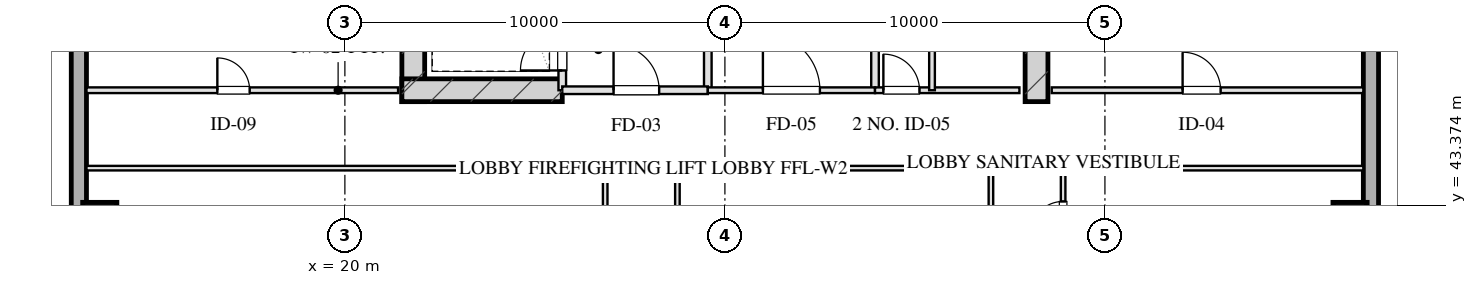
"""IFC4 building model, lengths in metres.
Left out: names, types, materials, properties, quantities, classifications, styles, units other than length and angle.
Written with IfcOpenShell. Run it as: python <this file> out.ifc"""

import sys

from ifc_helpers import new_model, si_unit, direction, frame, frame_2d, origin, origin_2d, place, context, subcontext, project, spatial, rectangle, hollow_rectangle, extrude, element, fill, save


model = new_model("IFC4")
c1 = context("Model", 3, precision=1e-05, world=origin(), true_north=direction((0.0, 1.0)))
c2 = subcontext(c1, "Body", "Model", "MODEL_VIEW")
j1 = project(units=[si_unit("LENGTHUNIT", "METRE"), si_unit("PLANEANGLEUNIT", "RADIAN")], contexts=[c1])
p1 = place(None, origin())
s1 = spatial("IfcSite", under=j1, at=p1, CompositionType="ELEMENT")
p2 = place(p1, origin())
s2 = spatial("IfcBuilding", under=s1, at=p2, CompositionType="ELEMENT")
p3 = place(p2, frame((0.0, 0.0, 159.85)))
s3 = spatial("IfcBuildingStorey", under=s2, at=p3, CompositionType="ELEMENT", Elevation=159.85)
for number, where, z_axis, x_axis in (
    (1, (21.8, 46.1, 0.0), (0.0, 0.0, 1.0), (0.0, 1.0, 0.0)),
    (2, (38.2, 46.1, 0.0), (0.0, 0.0, 1.0), (0.0, 1.0, 0.0)),
):
    element("IfcWall", number, at=place(p3, frame(where, z_axis=z_axis, x_axis=x_axis)), inside=s3, PredefinedType="SHEAR", context=c2, shape_type="SweptSolid", body=[
        extrude(rectangle(XDim=9.48, YDim=0.6, at=frame_2d((4.74, 0.0))), origin(), (0.0, 0.0, 1.0), 3.45),
    ])
p4 = place(p3, frame((21.5, 46.4, 0.0), z_axis=(0.0, 0.0, 1.0), x_axis=(1.0, 0.0, 0.0)))
e3 = element("IfcWall", 3, at=p4, inside=s3, PredefinedType="SHEAR", context=c2, shape_type="SweptSolid", body=[
    extrude(rectangle(XDim=4.22, YDim=0.6, at=frame_2d((2.11, 0.0))), origin(), (0.0, 0.0, 1.0), 3.45),
])
for number, where, z_axis, x_axis in (
    (4, (13.55, 43.0, 0.0), (0.0, 0.0, 1.0), (1.0, 0.0, 0.0)),
    (5, (46.45, 43.0, 0.0), (0.0, 0.0, 1.0), (1.0, 0.0, 0.0)),
):
    element("IfcColumn", number, at=place(p3, frame(where, z_axis=z_axis, x_axis=x_axis)), inside=s3, PredefinedType="COLUMN", context=c2, shape_type="SweptSolid", body=[
        extrude(hollow_rectangle(XDim=0.9, YDim=0.9, WallThickness=0.032, at=origin_2d()), origin(), (0.0, 0.0, 1.0), 3.451),
    ])
p5 = place(p3, frame((13.0, 10.8, 0.0), z_axis=(0.0, 0.0, 1.0), x_axis=(0.0, 1.0, 0.0)))
e6 = element("IfcWall", 6, at=p5, inside=s3, PredefinedType="SOLIDWALL", context=c2, shape_type="SweptSolid", body=[
    extrude(rectangle(XDim=46.4, YDim=0.4, at=frame_2d((23.2, 0.0))), origin(), (0.0, 0.0, 1.0), 2.61),
])
p6 = place(p5, frame((15.675, 0.0, 0.75)))
e7 = element("IfcOpeningElement", 7, at=p6, cuts=e6, PredefinedType="OPENING", context=c2, shape_type="SweptSolid", body=[
    extrude(rectangle(XDim=2.25, YDim=1.46, at=frame_2d((1.125, 0.73))), frame((0.0, 0.21, 0.0), z_axis=(0.0, -1.0, 0.0), x_axis=(1.0, 0.0, 0.0)), (0.0, 0.0, 1.0), 0.42),
])
p7 = place(p5, frame((28.475, 0.0, 0.75)))
e8 = element("IfcOpeningElement", 8, at=p7, cuts=e6, PredefinedType="OPENING", context=c2, shape_type="SweptSolid", body=[
    extrude(rectangle(XDim=2.25, YDim=1.46, at=frame_2d((1.125, 0.73))), frame((0.0, 0.21, 0.0), z_axis=(0.0, -1.0, 0.0), x_axis=(1.0, 0.0, 0.0)), (0.0, 0.0, 1.0), 0.42),
])
p8 = place(p3, frame((47.0, 57.2, 0.0), z_axis=(0.0, 0.0, 1.0), x_axis=(0.0, -1.0, 0.0)))
e9 = element("IfcWall", 9, at=p8, inside=s3, PredefinedType="SOLIDWALL", context=c2, shape_type="SweptSolid", body=[
    extrude(rectangle(XDim=46.4, YDim=0.4, at=frame_2d((23.2, 0.0))), origin(), (0.0, 0.0, 1.0), 2.61),
])
p9 = place(p3, frame((25.72, 46.4, 0.0), z_axis=(0.0, 0.0, 1.0), x_axis=(0.0, 1.0, 0.0)))
e10 = element("IfcWall", 10, at=p9, inside=s3, PredefinedType="PARTITIONING", context=c2, shape_type="SweptSolid", body=[
    extrude(rectangle(XDim=1.9, YDim=0.2, at=frame_2d((0.95, 0.0))), origin(), (0.0, 0.0, 1.0), 3.175),
])
p10 = place(p9, frame((0.52, 0.0, 0.0)))
e11 = element("IfcOpeningElement", 11, at=p10, cuts=e10, PredefinedType="OPENING", context=c2, shape_type="SweptSolid", body=[
    extrude(rectangle(XDim=1.1, YDim=2.05, at=frame_2d((0.55, 1.025))), frame((0.0, 0.11, 0.0), z_axis=(0.0, -1.0, 0.0), x_axis=(1.0, 0.0, 0.0)), (0.0, 0.0, 1.0), 0.22),
])
p11 = place(p3, frame((29.55, 46.4, 0.0), z_axis=(0.0, 0.0, 1.0), x_axis=(0.0, 1.0, 0.0)))
e12 = element("IfcWall", 12, at=p11, inside=s3, PredefinedType="PARTITIONING", context=c2, shape_type="SweptSolid", body=[
    extrude(rectangle(XDim=8.43, YDim=0.2, at=frame_2d((4.215, 0.0))), origin(), (0.0, 0.0, 1.0), 3.175),
])
p12 = place(p3, frame((25.72, 46.4, 0.0), z_axis=(0.0, 0.0, 1.0), x_axis=(1.0, 0.0, 0.0)))
e13 = element("IfcWall", 13, at=p12, inside=s3, PredefinedType="PARTITIONING", context=c2, shape_type="SweptSolid", body=[
    extrude(rectangle(XDim=3.83, YDim=0.2, at=frame_2d((1.915, 0.0))), origin(), (0.0, 0.0, 1.0), 3.175),
])
p13 = place(p12, frame((1.35, 0.0, 0.0)))
e14 = element("IfcOpeningElement", 14, at=p13, cuts=e13, PredefinedType="OPENING", context=c2, shape_type="SweptSolid", body=[
    extrude(rectangle(XDim=1.2, YDim=2.05, at=frame_2d((0.6, 1.025))), frame((0.0, 0.11, 0.0), z_axis=(0.0, -1.0, 0.0), x_axis=(1.0, 0.0, 0.0)), (0.0, 0.0, 1.0), 0.22),
])
p14 = place(p3, frame((33.95, 46.4, 0.0), z_axis=(0.0, 0.0, 1.0), x_axis=(0.0, 1.0, 0.0)))
e15 = element("IfcWall", 15, at=p14, inside=s3, PredefinedType="PARTITIONING", context=c2, shape_type="SweptSolid", body=[
    extrude(rectangle(XDim=8.43, YDim=0.2, at=frame_2d((4.215, 0.0))), origin(), (0.0, 0.0, 1.0), 3.175),
])
p15 = place(p3, frame((29.55, 46.4, 0.0), z_axis=(0.0, 0.0, 1.0), x_axis=(1.0, 0.0, 0.0)))
e16 = element("IfcWall", 16, at=p15, inside=s3, PredefinedType="PARTITIONING", context=c2, shape_type="SweptSolid", body=[
    extrude(rectangle(XDim=4.4, YDim=0.15, at=frame_2d((2.2, 0.0))), origin(), (0.0, 0.0, 1.0), 3.175),
])
p16 = place(p15, frame((1.45, 0.0, 0.0)))
e17 = element("IfcOpeningElement", 17, at=p16, cuts=e16, PredefinedType="OPENING", context=c2, shape_type="SweptSolid", body=[
    extrude(rectangle(XDim=1.5, YDim=2.05, at=frame_2d((0.75, 1.025))), frame((0.0, 0.085, 0.0), z_axis=(0.0, -1.0, 0.0), x_axis=(1.0, 0.0, 0.0)), (0.0, 0.0, 1.0), 0.17),
])
p17 = place(p3, frame((33.95, 46.4, 0.0), z_axis=(0.0, 0.0, 1.0), x_axis=(1.0, 0.0, 0.0)))
e18 = element("IfcWall", 18, at=p17, inside=s3, PredefinedType="PARTITIONING", context=c2, shape_type="SweptSolid", body=[
    extrude(rectangle(XDim=3.8, YDim=0.15, at=frame_2d((1.9, 0.0))), origin(), (0.0, 0.0, 1.0), 3.175),
])
p18 = place(p17, frame((0.22, 0.0, 0.0)))
e19 = element("IfcOpeningElement", 19, at=p18, cuts=e18, PredefinedType="OPENING", context=c2, shape_type="SweptSolid", body=[
    extrude(rectangle(XDim=0.95, YDim=2.05, at=frame_2d((0.475, 1.025))), frame((0.0, 0.085, 0.0), z_axis=(0.0, -1.0, 0.0), x_axis=(1.0, 0.0, 0.0)), (0.0, 0.0, 1.0), 0.17),
])
p19 = place(p3, frame((35.45, 46.4, 0.0), z_axis=(0.0, 0.0, 1.0), x_axis=(0.0, 1.0, 0.0)))
e20 = element("IfcWall", 20, at=p19, inside=s3, PredefinedType="PARTITIONING", context=c2, shape_type="SweptSolid", body=[
    extrude(rectangle(XDim=8.43, YDim=0.15, at=frame_2d((4.215, 0.0))), origin(), (0.0, 0.0, 1.0), 2.765),
])
p20 = place(p19, frame((2.55, 0.0, 0.0)))
e21 = element("IfcOpeningElement", 21, at=p20, cuts=e20, PredefinedType="OPENING", context=c2, shape_type="SweptSolid", body=[
    extrude(rectangle(XDim=0.95, YDim=2.05, at=frame_2d((0.475, 1.025))), frame((0.0, 0.085, 0.0), z_axis=(0.0, -1.0, 0.0), x_axis=(1.0, 0.0, 0.0)), (0.0, 0.0, 1.0), 0.17),
])
p21 = place(p19, frame((4.7, 0.0, 0.0)))
e22 = element("IfcOpeningElement", 22, at=p21, cuts=e20, PredefinedType="OPENING", context=c2, shape_type="SweptSolid", body=[
    extrude(rectangle(XDim=0.9, YDim=2.05, at=frame_2d((0.45, 1.025))), frame((0.0, 0.085, 0.0), z_axis=(0.0, -1.0, 0.0), x_axis=(1.0, 0.0, 0.0)), (0.0, 0.0, 1.0), 0.17),
])
p22 = place(p19, frame((6.8, 0.0, 0.0)))
e23 = element("IfcOpeningElement", 23, at=p22, cuts=e20, PredefinedType="OPENING", context=c2, shape_type="SweptSolid", body=[
    extrude(rectangle(XDim=0.9, YDim=2.05, at=frame_2d((0.45, 1.025))), frame((0.0, 0.085, 0.0), z_axis=(0.0, -1.0, 0.0), x_axis=(1.0, 0.0, 0.0)), (0.0, 0.0, 1.0), 0.17),
])
p23 = place(p3, frame((13.2, 46.4, 0.0), z_axis=(0.0, 0.0, 1.0), x_axis=(1.0, 0.0, 0.0)))
e24 = element("IfcWall", 24, at=p23, inside=s3, PredefinedType="PARTITIONING", context=c2, shape_type="SweptSolid", body=[
    extrude(rectangle(XDim=8.2, YDim=0.15, at=frame_2d((4.1, 0.0))), origin(), (0.0, 0.0, 1.0), 3.175),
])
p24 = place(p23, frame((3.444, 0.0, 0.0)))
e25 = element("IfcOpeningElement", 25, at=p24, cuts=e24, PredefinedType="OPENING", context=c2, shape_type="SweptSolid", body=[
    extrude(rectangle(XDim=0.85, YDim=2.05, at=frame_2d((0.425, 1.025))), frame((0.0, 0.085, 0.0), z_axis=(0.0, -1.0, 0.0), x_axis=(1.0, 0.0, 0.0)), (0.0, 0.0, 1.0), 0.17),
])
p25 = place(p3, frame((38.6, 46.4, 0.0), z_axis=(0.0, 0.0, 1.0), x_axis=(1.0, 0.0, 0.0)))
e26 = element("IfcWall", 26, at=p25, inside=s3, PredefinedType="PARTITIONING", context=c2, shape_type="SweptSolid", body=[
    extrude(rectangle(XDim=8.2, YDim=0.15, at=frame_2d((4.1, 0.0))), origin(), (0.0, 0.0, 1.0), 3.175),
])
p26 = place(p25, frame((3.444, 0.0, 0.0)))
e27 = element("IfcOpeningElement", 27, at=p26, cuts=e26, PredefinedType="OPENING", context=c2, shape_type="SweptSolid", body=[
    extrude(rectangle(XDim=1.0, YDim=2.05, at=frame_2d((0.5, 1.025))), frame((0.0, 0.085, 0.0), z_axis=(0.0, -1.0, 0.0), x_axis=(1.0, 0.0, 0.0)), (0.0, 0.0, 1.0), 0.17),
])
p27 = place(p3, frame((13.2, 44.35, 0.0), z_axis=(0.0, 0.0, 1.0), x_axis=(1.0, 0.0, 0.0)))
e28 = element("IfcWall", 28, at=p27, inside=s3, PredefinedType="PARTITIONING", context=c2, shape_type="SweptSolid", body=[
    extrude(rectangle(XDim=13.65, YDim=0.12, at=frame_2d((6.825, 0.0))), origin(), (0.0, 0.0, 1.0), 3.175),
])
p28 = place(p3, frame((28.75, 44.35, 0.0), z_axis=(0.0, 0.0, 1.0), x_axis=(1.0, 0.0, 0.0)))
e29 = element("IfcWall", 29, at=p28, inside=s3, PredefinedType="PARTITIONING", context=c2, shape_type="SweptSolid", body=[
    extrude(rectangle(XDim=8.25, YDim=0.12, at=frame_2d((4.125, 0.0))), origin(), (0.0, 0.0, 1.0), 3.175),
])
p29 = place(p3, frame((38.9, 44.35, 0.0), z_axis=(0.0, 0.0, 1.0), x_axis=(1.0, 0.0, 0.0)))
e30 = element("IfcWall", 30, at=p29, inside=s3, PredefinedType="PARTITIONING", context=c2, shape_type="SweptSolid", body=[
    extrude(rectangle(XDim=7.9, YDim=0.12, at=frame_2d((3.95, 0.0))), origin(), (0.0, 0.0, 1.0), 3.175),
])
p30 = place(p3, frame((26.85, 23.65, 0.0), z_axis=(0.0, 0.0, 1.0), x_axis=(0.0, 1.0, 0.0)))
e31 = element("IfcWall", 31, at=p30, inside=s3, PredefinedType="PARTITIONING", context=c2, shape_type="SweptSolid", body=[
    extrude(rectangle(XDim=20.7, YDim=0.12, at=frame_2d((10.35, 0.0))), origin(), (0.0, 0.0, 1.0), 3.175),
])
p31 = place(p30, frame((2.675, 0.0, 0.0)))
e32 = element("IfcOpeningElement", 32, at=p31, cuts=e31, PredefinedType="OPENING", context=c2, shape_type="SweptSolid", body=[
    extrude(rectangle(XDim=1.0, YDim=2.05, at=frame_2d((0.5, 1.025))), frame((0.0, 0.07, 0.0), z_axis=(0.0, -1.0, 0.0), x_axis=(1.0, 0.0, 0.0)), (0.0, 0.0, 1.0), 0.14),
])
p32 = place(p30, frame((9.85, 0.0, 0.0)))
e33 = element("IfcOpeningElement", 33, at=p32, cuts=e31, PredefinedType="OPENING", context=c2, shape_type="SweptSolid", body=[
    extrude(rectangle(XDim=1.0, YDim=2.05, at=frame_2d((0.5, 1.025))), frame((0.0, 0.07, 0.0), z_axis=(0.0, -1.0, 0.0), x_axis=(1.0, 0.0, 0.0)), (0.0, 0.0, 1.0), 0.14),
])
p33 = place(p30, frame((17.025, 0.0, 0.0)))
e34 = element("IfcOpeningElement", 34, at=p33, cuts=e31, PredefinedType="OPENING", context=c2, shape_type="SweptSolid", body=[
    extrude(rectangle(XDim=1.0, YDim=2.05, at=frame_2d((0.5, 1.025))), frame((0.0, 0.07, 0.0), z_axis=(0.0, -1.0, 0.0), x_axis=(1.0, 0.0, 0.0)), (0.0, 0.0, 1.0), 0.14),
])
p34 = place(p3, frame((28.75, 23.65, 0.0), z_axis=(0.0, 0.0, 1.0), x_axis=(0.0, 1.0, 0.0)))
e35 = element("IfcWall", 35, at=p34, inside=s3, PredefinedType="PARTITIONING", context=c2, shape_type="SweptSolid", body=[
    extrude(rectangle(XDim=20.7, YDim=0.12, at=frame_2d((10.35, 0.0))), origin(), (0.0, 0.0, 1.0), 3.175),
])
p35 = place(p34, frame((9.936, 0.0, 0.0)))
e36 = element("IfcOpeningElement", 36, at=p35, cuts=e35, PredefinedType="OPENING", context=c2, shape_type="SweptSolid", body=[
    extrude(rectangle(XDim=1.1, YDim=2.05, at=frame_2d((0.55, 1.025))), frame((0.0, 0.07, 0.0), z_axis=(0.0, -1.0, 0.0), x_axis=(1.0, 0.0, 0.0)), (0.0, 0.0, 1.0), 0.14),
])
p36 = place(p3, frame((37.0, 23.65, 0.0), z_axis=(0.0, 0.0, 1.0), x_axis=(0.0, 1.0, 0.0)))
e37 = element("IfcWall", 37, at=p36, inside=s3, PredefinedType="PARTITIONING", context=c2, shape_type="SweptSolid", body=[
    extrude(rectangle(XDim=20.7, YDim=0.12, at=frame_2d((10.35, 0.0))), origin(), (0.0, 0.0, 1.0), 3.175),
])
p37 = place(p3, frame((38.9, 23.65, 0.0), z_axis=(0.0, 0.0, 1.0), x_axis=(0.0, 1.0, 0.0)))
e38 = element("IfcWall", 38, at=p37, inside=s3, PredefinedType="PARTITIONING", context=c2, shape_type="SweptSolid", body=[
    extrude(rectangle(XDim=20.7, YDim=0.12, at=frame_2d((10.35, 0.0))), origin(), (0.0, 0.0, 1.0), 3.175),
])
p38 = place(p37, frame((0.775, 0.0, 0.0)))
e39 = element("IfcOpeningElement", 39, at=p38, cuts=e38, PredefinedType="OPENING", context=c2, shape_type="SweptSolid", body=[
    extrude(rectangle(XDim=1.0, YDim=2.05, at=frame_2d((0.5, 1.025))), frame((0.0, 0.07, 0.0), z_axis=(0.0, -1.0, 0.0), x_axis=(1.0, 0.0, 0.0)), (0.0, 0.0, 1.0), 0.14),
])
p39 = place(p37, frame((3.95, 0.0, 0.0)))
e40 = element("IfcOpeningElement", 40, at=p39, cuts=e38, PredefinedType="OPENING", context=c2, shape_type="SweptSolid", body=[
    extrude(rectangle(XDim=1.0, YDim=2.05, at=frame_2d((0.5, 1.025))), frame((0.0, 0.07, 0.0), z_axis=(0.0, -1.0, 0.0), x_axis=(1.0, 0.0, 0.0)), (0.0, 0.0, 1.0), 0.14),
])
p40 = place(p37, frame((8.45, 0.0, 0.0)))
e41 = element("IfcOpeningElement", 41, at=p40, cuts=e38, PredefinedType="OPENING", context=c2, shape_type="SweptSolid", body=[
    extrude(rectangle(XDim=1.0, YDim=2.05, at=frame_2d((0.5, 1.025))), frame((0.0, 0.07, 0.0), z_axis=(0.0, -1.0, 0.0), x_axis=(1.0, 0.0, 0.0)), (0.0, 0.0, 1.0), 0.14),
])
p41 = place(p37, frame((12.95, 0.0, 0.0)))
e42 = element("IfcOpeningElement", 42, at=p41, cuts=e38, PredefinedType="OPENING", context=c2, shape_type="SweptSolid", body=[
    extrude(rectangle(XDim=1.0, YDim=2.05, at=frame_2d((0.5, 1.025))), frame((0.0, 0.07, 0.0), z_axis=(0.0, -1.0, 0.0), x_axis=(1.0, 0.0, 0.0)), (0.0, 0.0, 1.0), 0.14),
])
p42 = place(p37, frame((16.299, 0.0, 0.0)))
e43 = element("IfcOpeningElement", 43, at=p42, cuts=e38, PredefinedType="OPENING", context=c2, shape_type="SweptSolid", body=[
    extrude(rectangle(XDim=1.0, YDim=2.05, at=frame_2d((0.5, 1.025))), frame((0.0, 0.07, 0.0), z_axis=(0.0, -1.0, 0.0), x_axis=(1.0, 0.0, 0.0)), (0.0, 0.0, 1.0), 0.14),
])
p43 = place(p37, frame((18.974, 0.0, 0.0)))
e44 = element("IfcOpeningElement", 44, at=p43, cuts=e38, PredefinedType="OPENING", context=c2, shape_type="SweptSolid", body=[
    extrude(rectangle(XDim=0.85, YDim=2.05, at=frame_2d((0.425, 1.025))), frame((0.0, 0.07, 0.0), z_axis=(0.0, -1.0, 0.0), x_axis=(1.0, 0.0, 0.0)), (0.0, 0.0, 1.0), 0.14),
])
p44 = place(p10, origin())
e45 = element("IfcDoor", 45, at=p44, inside=s3, OperationType="SINGLE_SWING_LEFT", PredefinedType="DOOR", context=c2, shape_type="SweptSolid", body=[
    extrude(rectangle(XDim=1.1, YDim=2.05, at=frame_2d((0.55, 1.025))), frame((0.0, 0.025, 0.0), z_axis=(0.0, -1.0, 0.0), x_axis=(1.0, 0.0, 0.0)), (0.0, 0.0, 1.0), 0.05),
])
fill(e11, e45)
p45 = place(p13, origin())
e46 = element("IfcDoor", 46, at=p45, inside=s3, OperationType="SINGLE_SWING_LEFT", PredefinedType="DOOR", context=c2, shape_type="SweptSolid", body=[
    extrude(rectangle(XDim=1.2, YDim=2.05, at=frame_2d((0.6, 1.025))), frame((0.0, 0.025, 0.0), z_axis=(0.0, -1.0, 0.0), x_axis=(1.0, 0.0, 0.0)), (0.0, 0.0, 1.0), 0.05),
])
fill(e14, e46)
p46 = place(p16, origin())
e47 = element("IfcDoor", 47, at=p46, inside=s3, OperationType="SINGLE_SWING_LEFT", PredefinedType="DOOR", context=c2, shape_type="SweptSolid", body=[
    extrude(rectangle(XDim=1.5, YDim=2.05, at=frame_2d((0.75, 1.025))), frame((0.0, 0.025, 0.0), z_axis=(0.0, -1.0, 0.0), x_axis=(1.0, 0.0, 0.0)), (0.0, 0.0, 1.0), 0.05),
])
fill(e17, e47)
p47 = place(p18, origin())
e48 = element("IfcDoor", 48, at=p47, inside=s3, OperationType="SINGLE_SWING_LEFT", PredefinedType="DOOR", context=c2, shape_type="SweptSolid", body=[
    extrude(rectangle(XDim=0.95, YDim=2.05, at=frame_2d((0.475, 1.025))), frame((0.0, 0.025, 0.0), z_axis=(0.0, -1.0, 0.0), x_axis=(1.0, 0.0, 0.0)), (0.0, 0.0, 1.0), 0.05),
])
fill(e19, e48)
p48 = place(p24, origin())
e49 = element("IfcDoor", 49, at=p48, inside=s3, OperationType="SINGLE_SWING_LEFT", PredefinedType="DOOR", context=c2, shape_type="SweptSolid", body=[
    extrude(rectangle(XDim=0.85, YDim=2.05, at=frame_2d((0.425, 1.025))), frame((0.0, 0.025, 0.0), z_axis=(0.0, -1.0, 0.0), x_axis=(1.0, 0.0, 0.0)), (0.0, 0.0, 1.0), 0.05),
])
fill(e25, e49)
p49 = place(p26, origin())
e50 = element("IfcDoor", 50, at=p49, inside=s3, OperationType="SINGLE_SWING_LEFT", PredefinedType="DOOR", context=c2, shape_type="SweptSolid", body=[
    extrude(rectangle(XDim=1.0, YDim=2.05, at=frame_2d((0.5, 1.025))), frame((0.0, 0.025, 0.0), z_axis=(0.0, -1.0, 0.0), x_axis=(1.0, 0.0, 0.0)), (0.0, 0.0, 1.0), 0.05),
])
fill(e27, e50)
p50 = place(p43, origin())
e51 = element("IfcDoor", 51, at=p50, inside=s3, OperationType="SINGLE_SWING_LEFT", PredefinedType="DOOR", context=c2, shape_type="SweptSolid", body=[
    extrude(rectangle(XDim=0.85, YDim=2.05, at=frame_2d((0.425, 1.025))), frame((0.0, 0.025, 0.0), z_axis=(0.0, -1.0, 0.0), x_axis=(1.0, 0.0, 0.0)), (0.0, 0.0, 1.0), 0.05),
])
fill(e44, e51)
save(model, sys.argv[1])
